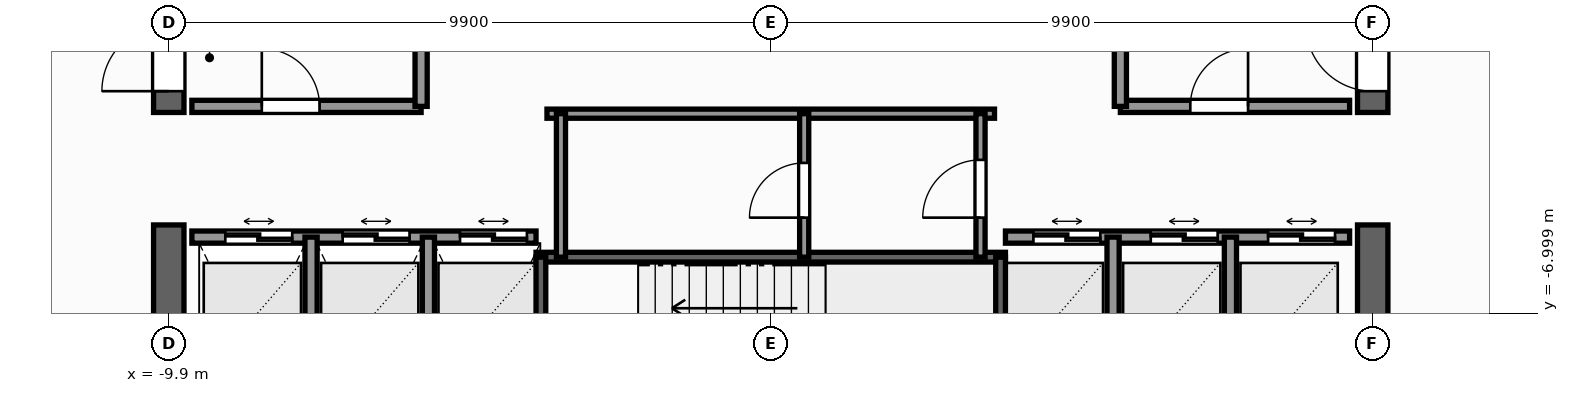
"""IFC4 building model, lengths in metres.
Left out: names, types, materials, properties, quantities, classifications, styles, units other than length and angle.
Written with IfcOpenShell. Run it as: python <this file> out.ifc"""

import sys

from ifc_helpers import new_model, si_unit, direction, frame, frame_2d, origin, place, context, subcontext, project, spatial, rectangle, extrude, element, fill, save


model = new_model("IFC4")
c1 = context("Model", 3, precision=1e-05, world=origin(), true_north=direction((0.0, 1.0)))
c2 = subcontext(c1, "Body", "Model", "MODEL_VIEW")
j1 = project(units=[si_unit("LENGTHUNIT", "METRE"), si_unit("PLANEANGLEUNIT", "RADIAN")], contexts=[c1])
p1 = place(None, origin())
s1 = spatial("IfcSite", under=j1, at=p1, CompositionType="ELEMENT")
p2 = place(p1, origin())
s2 = spatial("IfcBuilding", under=s1, at=p2, CompositionType="ELEMENT")
p3 = place(p2, frame((0.0, 0.0, 152.7)))
s3 = spatial("IfcBuildingStorey", under=s2, at=p3, CompositionType="ELEMENT", Elevation=152.7)
for number, where, z_axis, x_axis in (
    (1, (-9.9, -9.65, 0.0), (0.0, 0.0, 1.0), (0.0, 1.0, 0.0)),
    (2, (9.9, -9.65, 0.0), (0.0, 0.0, 1.0), (0.0, 1.0, 0.0)),
):
    element("IfcWall", number, at=place(p3, frame(where, z_axis=z_axis, x_axis=x_axis)), inside=s3, PredefinedType="SHEAR", context=c2, shape_type="SweptSolid", body=[
        extrude(rectangle(XDim=4.1, YDim=0.5, at=frame_2d((2.05, 0.0))), origin(), (0.0, 0.0, 1.0), 4.2),
    ])
p4 = place(p3, frame((-9.9, -3.7, 0.0), z_axis=(0.0, 0.0, 1.0), x_axis=(0.0, 1.0, 0.0)))
e3 = element("IfcWall", 3, at=p4, inside=s3, PredefinedType="SHEAR", context=c2, shape_type="SweptSolid", body=[
    extrude(rectangle(XDim=13.35, YDim=0.5, at=frame_2d((6.675, 0.0))), origin(), (0.0, 0.0, 1.0), 4.2),
])
p5 = place(p4, frame((0.35, 0.0, 0.0)))
e4 = element("IfcOpeningElement", 4, at=p5, cuts=e3, PredefinedType="OPENING", context=c2, shape_type="SweptSolid", body=[
    extrude(rectangle(XDim=1.1, YDim=2.2, at=frame_2d((0.55, 1.1))), frame((0.0, 0.26, 0.0), z_axis=(0.0, -1.0, 0.0), x_axis=(1.0, 0.0, 0.0)), (0.0, 0.0, 1.0), 0.52),
])
p6 = place(p3, frame((9.9, -3.7, 0.0), z_axis=(0.0, 0.0, 1.0), x_axis=(0.0, 1.0, 0.0)))
e5 = element("IfcWall", 5, at=p6, inside=s3, PredefinedType="SHEAR", context=c2, shape_type="SweptSolid", body=[
    extrude(rectangle(XDim=13.35, YDim=0.5, at=frame_2d((6.675, 0.0))), origin(), (0.0, 0.0, 1.0), 4.2),
])
p7 = place(p6, frame((0.35, 0.0, 0.0)))
e6 = element("IfcOpeningElement", 6, at=p7, cuts=e5, PredefinedType="OPENING", context=c2, shape_type="SweptSolid", body=[
    extrude(rectangle(XDim=1.1, YDim=2.2, at=frame_2d((0.55, 1.1))), frame((0.0, 0.26, 0.0), z_axis=(0.0, -1.0, 0.0), x_axis=(1.0, 0.0, 0.0)), (0.0, 0.0, 1.0), 0.52),
])
p8 = place(p3, frame((-3.86, -6.08, 0.0), z_axis=(0.0, 0.0, 1.0), x_axis=(1.0, 0.0, 0.0)))
e7 = element("IfcWall", 7, at=p8, inside=s3, PredefinedType="SHEAR", context=c2, shape_type="SweptSolid", body=[
    extrude(rectangle(XDim=7.72, YDim=0.16, at=frame_2d((3.86, 0.0))), origin(), (0.0, 0.0, 1.0), 4.2),
])
for number, where, z_axis, x_axis in (
    (8, (-3.78, -9.43, 0.0), (0.0, 0.0, 1.0), (0.0, 1.0, 0.0)),
    (9, (3.78, -9.43, 0.0), (0.0, 0.0, 1.0), (0.0, 1.0, 0.0)),
):
    element("IfcWall", number, at=place(p3, frame(where, z_axis=z_axis, x_axis=x_axis)), inside=s3, PredefinedType="SHEAR", context=c2, shape_type="SweptSolid", body=[
        extrude(rectangle(XDim=3.35, YDim=0.16, at=frame_2d((1.675, 0.0))), origin(), (0.0, 0.0, 1.0), 4.2),
    ])
p9 = place(p3, frame((-9.52, -3.6, 0.0), z_axis=(0.0, 0.0, 1.0), x_axis=(1.0, 0.0, 0.0)))
e10 = element("IfcWall", 10, at=p9, inside=s3, PredefinedType="SOLIDWALL", context=c2, shape_type="SweptSolid", body=[
    extrude(rectangle(XDim=3.77, YDim=0.2, at=frame_2d((1.885, 0.0))), origin(), (0.0, 0.0, 1.0), 4.0),
])
p10 = place(p9, frame((1.15, 0.0, 0.0)))
e11 = element("IfcOpeningElement", 11, at=p10, cuts=e10, PredefinedType="OPENING", context=c2, shape_type="SweptSolid", body=[
    extrude(rectangle(XDim=0.95, YDim=2.06, at=frame_2d((0.475, 1.03))), frame((0.0, 0.11, 0.0), z_axis=(0.0, -1.0, 0.0), x_axis=(1.0, 0.0, 0.0)), (0.0, 0.0, 1.0), 0.22),
])
p11 = place(p3, frame((-5.75, -3.6, 0.0), z_axis=(0.0, 0.0, 1.0), x_axis=(0.0, 1.0, 0.0)))
e12 = element("IfcWall", 12, at=p11, inside=s3, PredefinedType="SOLIDWALL", context=c2, shape_type="SweptSolid", body=[
    extrude(rectangle(XDim=5.57, YDim=0.2, at=frame_2d((2.785, 0.0))), origin(), (0.0, 0.0, 1.0), 3.635),
])
p12 = place(p11, frame((2.75, 0.0, 0.0)))
e13 = element("IfcOpeningElement", 13, at=p12, cuts=e12, PredefinedType="OPENING", context=c2, shape_type="SweptSolid", body=[
    extrude(rectangle(XDim=1.1, YDim=2.2, at=frame_2d((0.55, 1.1))), frame((0.0, 0.11, 0.0), z_axis=(0.0, -1.0, 0.0), x_axis=(1.0, 0.0, 0.0)), (0.0, 0.0, 1.0), 0.22),
])
p13 = place(p3, frame((5.75, -3.6, 0.0), z_axis=(0.0, 0.0, 1.0), x_axis=(1.0, 0.0, 0.0)))
e14 = element("IfcWall", 14, at=p13, inside=s3, PredefinedType="SOLIDWALL", context=c2, shape_type="SweptSolid", body=[
    extrude(rectangle(XDim=3.77, YDim=0.2, at=frame_2d((1.885, 0.0))), origin(), (0.0, 0.0, 1.0), 4.0),
])
p14 = place(p13, frame((1.15, 0.0, 0.0)))
e15 = element("IfcOpeningElement", 15, at=p14, cuts=e14, PredefinedType="OPENING", context=c2, shape_type="SweptSolid", body=[
    extrude(rectangle(XDim=0.95, YDim=2.06, at=frame_2d((0.475, 1.03))), frame((0.0, 0.11, 0.0), z_axis=(0.0, -1.0, 0.0), x_axis=(1.0, 0.0, 0.0)), (0.0, 0.0, 1.0), 0.22),
])
p15 = place(p3, frame((5.75, -3.6, 0.0), z_axis=(0.0, 0.0, 1.0), x_axis=(0.0, 1.0, 0.0)))
e16 = element("IfcWall", 16, at=p15, inside=s3, PredefinedType="SOLIDWALL", context=c2, shape_type="SweptSolid", body=[
    extrude(rectangle(XDim=5.57, YDim=0.2, at=frame_2d((2.785, 0.0))), origin(), (0.0, 0.0, 1.0), 3.635),
])
p16 = place(p15, frame((2.75, 0.0, 0.0)))
e17 = element("IfcOpeningElement", 17, at=p16, cuts=e16, PredefinedType="OPENING", context=c2, shape_type="SweptSolid", body=[
    extrude(rectangle(XDim=1.1, YDim=2.2, at=frame_2d((0.55, 1.1))), frame((0.0, 0.11, 0.0), z_axis=(0.0, -1.0, 0.0), x_axis=(1.0, 0.0, 0.0)), (0.0, 0.0, 1.0), 0.22),
])
p17 = place(p3, frame((-9.52, -5.75, 0.0), z_axis=(0.0, 0.0, 1.0), x_axis=(1.0, 0.0, 0.0)))
e18 = element("IfcWall", 18, at=p17, inside=s3, PredefinedType="SOLIDWALL", context=c2, shape_type="SweptSolid", body=[
    extrude(rectangle(XDim=5.66, YDim=0.2, at=frame_2d((2.83, 0.0))), origin(), (0.0, 0.0, 1.0), 4.0),
])
p18 = place(p17, frame((0.55, 0.0, 0.0)))
e19 = element("IfcOpeningElement", 19, at=p18, cuts=e18, PredefinedType="OPENING", context=c2, shape_type="SweptSolid", body=[
    extrude(rectangle(XDim=1.1, YDim=2.2, at=frame_2d((0.55, 1.1))), frame((0.0, 0.11, 0.0), z_axis=(0.0, -1.0, 0.0), x_axis=(1.0, 0.0, 0.0)), (0.0, 0.0, 1.0), 0.22),
])
p19 = place(p17, frame((2.48, 0.0, 0.0)))
e20 = element("IfcOpeningElement", 20, at=p19, cuts=e18, PredefinedType="OPENING", context=c2, shape_type="SweptSolid", body=[
    extrude(rectangle(XDim=1.1, YDim=2.2, at=frame_2d((0.55, 1.1))), frame((0.0, 0.11, 0.0), z_axis=(0.0, -1.0, 0.0), x_axis=(1.0, 0.0, 0.0)), (0.0, 0.0, 1.0), 0.22),
])
p20 = place(p17, frame((4.41, 0.0, 0.0)))
e21 = element("IfcOpeningElement", 21, at=p20, cuts=e18, PredefinedType="OPENING", context=c2, shape_type="SweptSolid", body=[
    extrude(rectangle(XDim=1.1, YDim=2.2, at=frame_2d((0.55, 1.1))), frame((0.0, 0.11, 0.0), z_axis=(0.0, -1.0, 0.0), x_axis=(1.0, 0.0, 0.0)), (0.0, 0.0, 1.0), 0.22),
])
for number, where, z_axis, x_axis in (
    (22, (-7.56, -9.52, 0.0), (0.0, 0.0, 1.0), (0.0, 1.0, 0.0)),
    (23, (-5.63, -9.52, 0.0), (0.0, 0.0, 1.0), (0.0, 1.0, 0.0)),
):
    element("IfcWall", number, at=place(p3, frame(where, z_axis=z_axis, x_axis=x_axis)), inside=s3, PredefinedType="SOLIDWALL", context=c2, shape_type="SweptSolid", body=[
        extrude(rectangle(XDim=3.77, YDim=0.2, at=frame_2d((1.885, 0.0))), origin(), (0.0, 0.0, 1.0), 4.0),
    ])
p21 = place(p3, frame((3.86, -5.75, 0.0), z_axis=(0.0, 0.0, 1.0), x_axis=(1.0, 0.0, 0.0)))
e24 = element("IfcWall", 24, at=p21, inside=s3, PredefinedType="SOLIDWALL", context=c2, shape_type="SweptSolid", body=[
    extrude(rectangle(XDim=5.66, YDim=0.2, at=frame_2d((2.83, 0.0))), origin(), (0.0, 0.0, 1.0), 4.0),
])
p22 = place(p21, frame((0.46, 0.0, 0.0)))
e25 = element("IfcOpeningElement", 25, at=p22, cuts=e24, PredefinedType="OPENING", context=c2, shape_type="SweptSolid", body=[
    extrude(rectangle(XDim=1.1, YDim=2.2, at=frame_2d((0.55, 1.1))), frame((0.0, 0.11, 0.0), z_axis=(0.0, -1.0, 0.0), x_axis=(1.0, 0.0, 0.0)), (0.0, 0.0, 1.0), 0.22),
])
p23 = place(p21, frame((2.39, 0.0, 0.0)))
e26 = element("IfcOpeningElement", 26, at=p23, cuts=e24, PredefinedType="OPENING", context=c2, shape_type="SweptSolid", body=[
    extrude(rectangle(XDim=1.1, YDim=2.2, at=frame_2d((0.55, 1.1))), frame((0.0, 0.11, 0.0), z_axis=(0.0, -1.0, 0.0), x_axis=(1.0, 0.0, 0.0)), (0.0, 0.0, 1.0), 0.22),
])
p24 = place(p21, frame((4.32, 0.0, 0.0)))
e27 = element("IfcOpeningElement", 27, at=p24, cuts=e24, PredefinedType="OPENING", context=c2, shape_type="SweptSolid", body=[
    extrude(rectangle(XDim=1.1, YDim=2.2, at=frame_2d((0.55, 1.1))), frame((0.0, 0.11, 0.0), z_axis=(0.0, -1.0, 0.0), x_axis=(1.0, 0.0, 0.0)), (0.0, 0.0, 1.0), 0.22),
])
for number, where, z_axis, x_axis in (
    (28, (5.63, -9.52, 0.0), (0.0, 0.0, 1.0), (0.0, 1.0, 0.0)),
    (29, (7.56, -9.52, 0.0), (0.0, 0.0, 1.0), (0.0, 1.0, 0.0)),
):
    element("IfcWall", number, at=place(p3, frame(where, z_axis=z_axis, x_axis=x_axis)), inside=s3, PredefinedType="SOLIDWALL", context=c2, shape_type="SweptSolid", body=[
        extrude(rectangle(XDim=3.77, YDim=0.2, at=frame_2d((1.885, 0.0))), origin(), (0.0, 0.0, 1.0), 4.0),
    ])
p25 = place(p3, frame((-3.68, -3.72, 0.0), z_axis=(0.0, 0.0, 1.0), x_axis=(1.0, 0.0, 0.0)))
e30 = element("IfcWall", 30, at=p25, inside=s3, PredefinedType="PARTITIONING", context=c2, shape_type="SweptSolid", body=[
    extrude(rectangle(XDim=7.36, YDim=0.15, at=frame_2d((3.68, 0.0))), origin(), (0.0, 0.0, 1.0), 4.0),
])
p26 = place(p3, frame((3.45, -6.08, 0.0), z_axis=(0.0, 0.0, 1.0), x_axis=(0.0, 1.0, 0.0)))
e31 = element("IfcWall", 31, at=p26, inside=s3, PredefinedType="PARTITIONING", context=c2, shape_type="SweptSolid", body=[
    extrude(rectangle(XDim=2.36, YDim=0.15, at=frame_2d((1.18, 0.0))), origin(), (0.0, 0.0, 1.0), 4.0),
])
p27 = place(p26, frame((0.65, 0.0, 0.0)))
e32 = element("IfcOpeningElement", 32, at=p27, cuts=e31, PredefinedType="OPENING", context=c2, shape_type="SweptSolid", body=[
    extrude(rectangle(XDim=0.95, YDim=2.06, at=frame_2d((0.475, 1.03))), frame((0.0, 0.085, 0.0), z_axis=(0.0, -1.0, 0.0), x_axis=(1.0, 0.0, 0.0)), (0.0, 0.0, 1.0), 0.17),
])
p28 = place(p3, frame((-3.45, -6.08, 0.0), z_axis=(0.0, 0.0, 1.0), x_axis=(0.0, 1.0, 0.0)))
e33 = element("IfcWall", 33, at=p28, inside=s3, PredefinedType="PARTITIONING", context=c2, shape_type="SweptSolid", body=[
    extrude(rectangle(XDim=2.36, YDim=0.15, at=frame_2d((1.18, 0.0))), origin(), (0.0, 0.0, 1.0), 4.0),
])
p29 = place(p3, frame((0.55, -6.08, 0.0), z_axis=(0.0, 0.0, 1.0), x_axis=(0.0, 1.0, 0.0)))
e34 = element("IfcWall", 34, at=p29, inside=s3, PredefinedType="PARTITIONING", context=c2, shape_type="SweptSolid", body=[
    extrude(rectangle(XDim=2.36, YDim=0.15, at=frame_2d((1.18, 0.0))), origin(), (0.0, 0.0, 1.0), 4.0),
])
p30 = place(p29, frame((0.65, 0.0, 0.0)))
e35 = element("IfcOpeningElement", 35, at=p30, cuts=e34, PredefinedType="OPENING", context=c2, shape_type="SweptSolid", body=[
    extrude(rectangle(XDim=0.9, YDim=2.06, at=frame_2d((0.45, 1.03))), frame((0.0, 0.085, 0.0), z_axis=(0.0, -1.0, 0.0), x_axis=(1.0, 0.0, 0.0)), (0.0, 0.0, 1.0), 0.17),
])
p31 = place(p5, origin())
e36 = element("IfcDoor", 36, at=p31, inside=s3, OperationType="SINGLE_SWING_LEFT", PredefinedType="DOOR", context=c2, shape_type="SweptSolid", body=[
    extrude(rectangle(XDim=1.1, YDim=2.2, at=frame_2d((0.55, 1.1))), frame((0.0, 0.025, 0.0), z_axis=(0.0, -1.0, 0.0), x_axis=(1.0, 0.0, 0.0)), (0.0, 0.0, 1.0), 0.05),
])
fill(e4, e36)
p32 = place(p7, origin())
e37 = element("IfcDoor", 37, at=p32, inside=s3, OperationType="SINGLE_SWING_RIGHT", PredefinedType="DOOR", context=c2, shape_type="SweptSolid", body=[
    extrude(rectangle(XDim=1.1, YDim=2.2, at=frame_2d((0.55, 1.1))), frame((0.0, 0.025, 0.0), z_axis=(0.0, -1.0, 0.0), x_axis=(1.0, 0.0, 0.0)), (0.0, 0.0, 1.0), 0.05),
])
fill(e6, e37)
p33 = place(p18, origin())
e38 = element("IfcDoor", 38, at=p33, inside=s3, OperationType="DOUBLE_DOOR_SLIDING", PredefinedType="DOOR", context=c2, shape_type="SweptSolid", body=[
    extrude(rectangle(XDim=1.1, YDim=2.2, at=frame_2d((0.55, 1.1))), frame((0.0, 0.025, 0.0), z_axis=(0.0, -1.0, 0.0), x_axis=(1.0, 0.0, 0.0)), (0.0, 0.0, 1.0), 0.05),
])
fill(e19, e38)
p34 = place(p19, origin())
e39 = element("IfcDoor", 39, at=p34, inside=s3, OperationType="DOUBLE_DOOR_SLIDING", PredefinedType="DOOR", context=c2, shape_type="SweptSolid", body=[
    extrude(rectangle(XDim=1.1, YDim=2.2, at=frame_2d((0.55, 1.1))), frame((0.0, 0.025, 0.0), z_axis=(0.0, -1.0, 0.0), x_axis=(1.0, 0.0, 0.0)), (0.0, 0.0, 1.0), 0.05),
])
fill(e20, e39)
p35 = place(p20, origin())
e40 = element("IfcDoor", 40, at=p35, inside=s3, OperationType="DOUBLE_DOOR_SLIDING", PredefinedType="DOOR", context=c2, shape_type="SweptSolid", body=[
    extrude(rectangle(XDim=1.1, YDim=2.2, at=frame_2d((0.55, 1.1))), frame((0.0, 0.025, 0.0), z_axis=(0.0, -1.0, 0.0), x_axis=(1.0, 0.0, 0.0)), (0.0, 0.0, 1.0), 0.05),
])
fill(e21, e40)
p36 = place(p10, origin())
e41 = element("IfcDoor", 41, at=p36, inside=s3, OperationType="SINGLE_SWING_LEFT", PredefinedType="DOOR", context=c2, shape_type="SweptSolid", body=[
    extrude(rectangle(XDim=0.95, YDim=2.06, at=frame_2d((0.475, 1.03))), frame((0.0, 0.025, 0.0), z_axis=(0.0, -1.0, 0.0), x_axis=(1.0, 0.0, 0.0)), (0.0, 0.0, 1.0), 0.05),
])
fill(e11, e41)
p37 = place(p22, origin())
e42 = element("IfcDoor", 42, at=p37, inside=s3, OperationType="DOUBLE_DOOR_SLIDING", PredefinedType="DOOR", context=c2, shape_type="SweptSolid", body=[
    extrude(rectangle(XDim=1.1, YDim=2.2, at=frame_2d((0.55, 1.1))), frame((0.0, 0.025, 0.0), z_axis=(0.0, -1.0, 0.0), x_axis=(1.0, 0.0, 0.0)), (0.0, 0.0, 1.0), 0.05),
])
fill(e25, e42)
p38 = place(p23, origin())
e43 = element("IfcDoor", 43, at=p38, inside=s3, OperationType="DOUBLE_DOOR_SLIDING", PredefinedType="DOOR", context=c2, shape_type="SweptSolid", body=[
    extrude(rectangle(XDim=1.1, YDim=2.2, at=frame_2d((0.55, 1.1))), frame((0.0, 0.025, 0.0), z_axis=(0.0, -1.0, 0.0), x_axis=(1.0, 0.0, 0.0)), (0.0, 0.0, 1.0), 0.05),
])
fill(e26, e43)
p39 = place(p24, origin())
e44 = element("IfcDoor", 44, at=p39, inside=s3, OperationType="DOUBLE_DOOR_SLIDING", PredefinedType="DOOR", context=c2, shape_type="SweptSolid", body=[
    extrude(rectangle(XDim=1.1, YDim=2.2, at=frame_2d((0.55, 1.1))), frame((0.0, 0.025, 0.0), z_axis=(0.0, -1.0, 0.0), x_axis=(1.0, 0.0, 0.0)), (0.0, 0.0, 1.0), 0.05),
])
fill(e27, e44)
p40 = place(p14, origin())
e45 = element("IfcDoor", 45, at=p40, inside=s3, OperationType="SINGLE_SWING_RIGHT", PredefinedType="DOOR", context=c2, shape_type="SweptSolid", body=[
    extrude(rectangle(XDim=0.95, YDim=2.06, at=frame_2d((0.475, 1.03))), frame((0.0, 0.025, 0.0), z_axis=(0.0, -1.0, 0.0), x_axis=(1.0, 0.0, 0.0)), (0.0, 0.0, 1.0), 0.05),
])
fill(e15, e45)
p41 = place(p27, origin())
e46 = element("IfcDoor", 46, at=p41, inside=s3, OperationType="SINGLE_SWING_LEFT", PredefinedType="DOOR", context=c2, shape_type="SweptSolid", body=[
    extrude(rectangle(XDim=0.95, YDim=2.06, at=frame_2d((0.475, 1.03))), frame((0.0, 0.025, 0.0), z_axis=(0.0, -1.0, 0.0), x_axis=(1.0, 0.0, 0.0)), (0.0, 0.0, 1.0), 0.05),
])
fill(e32, e46)
p42 = place(p30, origin())
e47 = element("IfcDoor", 47, at=p42, inside=s3, OperationType="SINGLE_SWING_LEFT", PredefinedType="DOOR", context=c2, shape_type="SweptSolid", body=[
    extrude(rectangle(XDim=0.9, YDim=2.06, at=frame_2d((0.45, 1.03))), frame((0.0, 0.025, 0.0), z_axis=(0.0, -1.0, 0.0), x_axis=(1.0, 0.0, 0.0)), (0.0, 0.0, 1.0), 0.05),
])
fill(e35, e47)
save(model, sys.argv[1])
